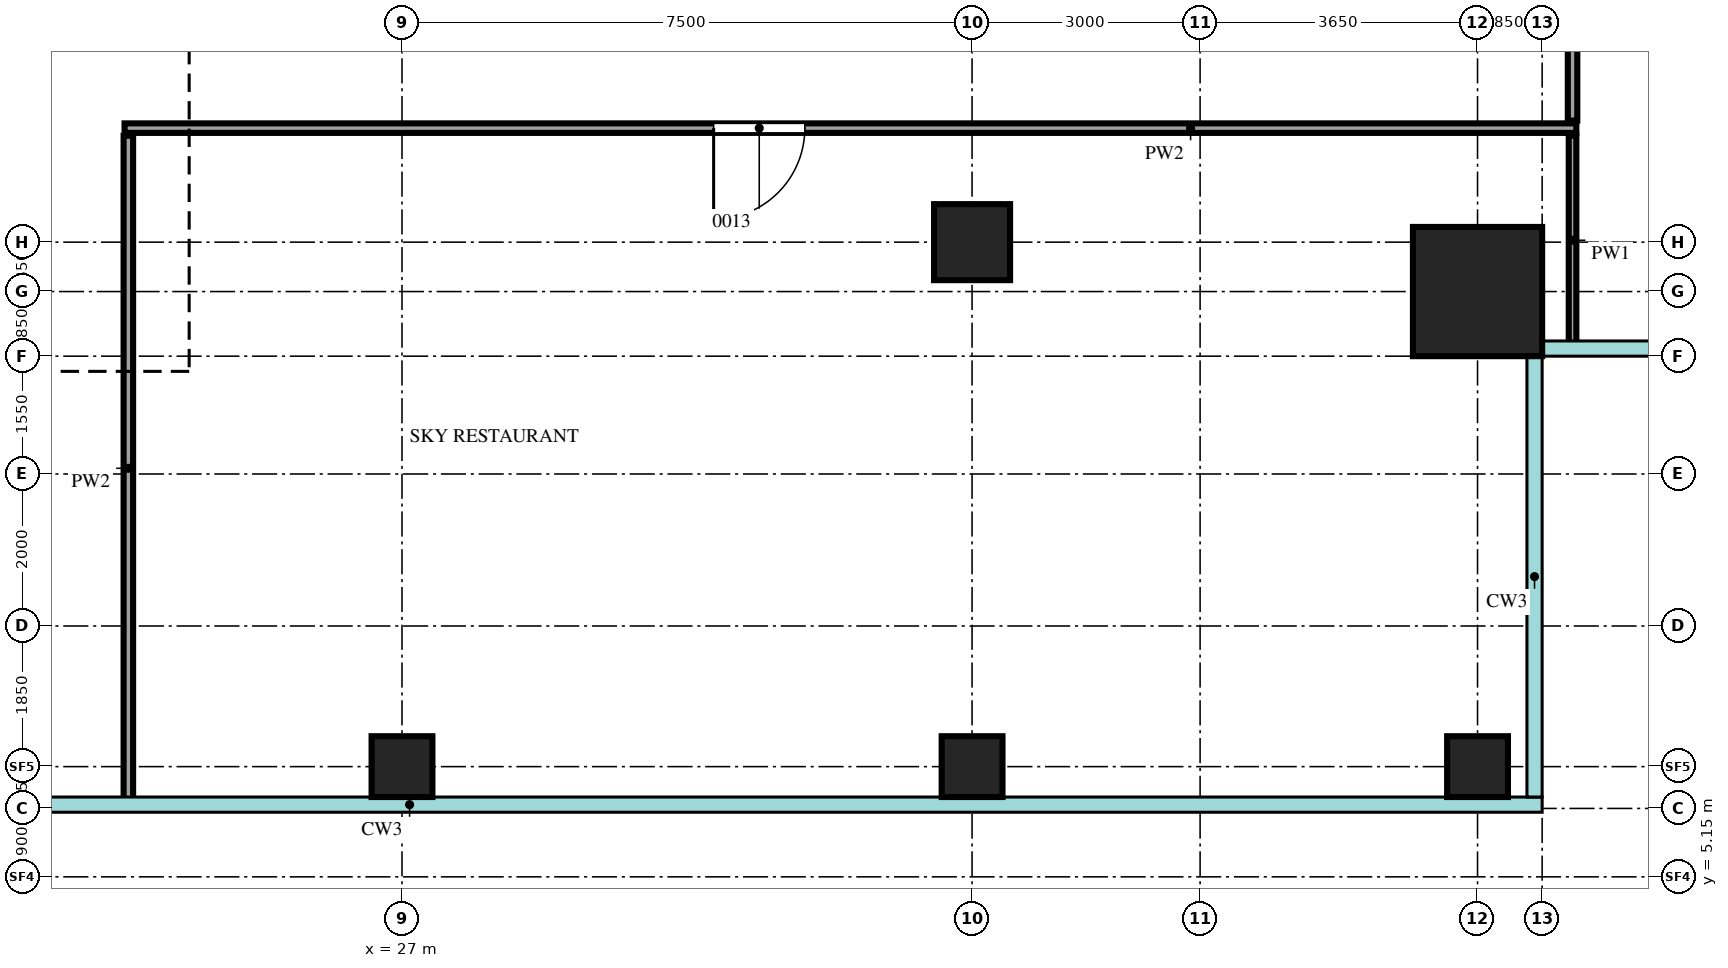
"""IFC4 building model, lengths in metres.
Left out: names, types, materials, properties, quantities, classifications, styles, units other than length and angle.
Written with IfcOpenShell. Run it as: python <this file> out.ifc"""

import sys

from ifc_helpers import new_model, si_unit, direction, frame, frame_2d, origin, origin_2d, place, context, subcontext, project, spatial, rectangle, extrude, source, transform, mapped, element, fill, save


model = new_model("IFC4")
c1 = context("Model", 3, precision=1e-05, world=origin(), true_north=direction((0.0, 1.0)))
c2 = subcontext(c1, "Body", "Model", "MODEL_VIEW")
j1 = project(units=[si_unit("LENGTHUNIT", "METRE"), si_unit("PLANEANGLEUNIT", "RADIAN")], contexts=[c1])
p1 = place(None, origin())
s1 = spatial("IfcSite", under=j1, at=p1, CompositionType="ELEMENT")
p2 = place(p1, origin())
s2 = spatial("IfcBuilding", under=s1, at=p2, CompositionType="ELEMENT")
p3 = place(p2, frame((0.0, 0.0, 310.2)))
s3 = spatial("IfcBuildingStorey", under=s2, at=p3, CompositionType="ELEMENT", Elevation=310.2)
m1 = source(origin(), c2, "Body", "SweptSolid", [
    extrude(rectangle(XDim=1.7, YDim=1.7, at=origin_2d()), origin(), (0.0, 0.0, 1.0), 3.75),
])
p4 = place(p3, frame((41.15, 12.85, 0.0), z_axis=(0.0, 0.0, 1.0), x_axis=(1.0, 0.0, 0.0)))
e1 = element("IfcColumn", 1, at=p4, inside=s3, PredefinedType="COLUMN", context=c2, shape_type="MappedRepresentation", body=[
    mapped(m1, transform((0.0, 0.0, 0.0))),
])
m2 = source(origin(), c2, "Body", "SweptSolid", [
    extrude(rectangle(XDim=0.8, YDim=0.8, at=origin_2d()), origin(), (0.0, 0.0, 1.0), 3.75),
])
for number, where, z_axis, x_axis in (
    (2, (27.0, 6.6, 0.0), (0.0, 0.0, 1.0), (1.0, 0.0, 0.0)),
    (3, (34.5, 6.6, 0.0), (0.0, 0.0, 1.0), (1.0, 0.0, 0.0)),
    (4, (41.15, 6.6, 0.0), (0.0, 0.0, 1.0), (1.0, 0.0, 0.0)),
):
    element("IfcColumn", number, at=place(p3, frame(where, z_axis=z_axis, x_axis=x_axis)), inside=s3, PredefinedType="COLUMN", context=c2, shape_type="MappedRepresentation", body=[
        mapped(m2, transform((0.0, 0.0, 0.0))),
    ])
m3 = source(origin(), c2, "Body", "SweptSolid", [
    extrude(rectangle(XDim=1.0, YDim=1.0, at=origin_2d()), origin(), (0.0, 0.0, 1.0), 3.75),
])
p5 = place(p3, frame((34.5, 13.5, 0.0), z_axis=(0.0, 0.0, 1.0), x_axis=(1.0, 0.0, 0.0)))
e5 = element("IfcColumn", 5, at=p5, inside=s3, PredefinedType="COLUMN", context=c2, shape_type="MappedRepresentation", body=[
    mapped(m3, transform((0.0, 0.0, 0.0))),
])
m4 = source(origin(), c2, "Body", "SweptSolid", [
    extrude(rectangle(XDim=8.75, YDim=0.125, at=frame_2d((4.375, 0.0))), origin(), (0.0, 0.0, 1.0), 3.8),
])
p6 = place(p3, frame((23.4, 6.15, 0.0), z_axis=(0.0, 0.0, 1.0), x_axis=(0.0, 1.0, 0.0)))
e6 = element("IfcWall", 6, at=p6, inside=s3, PredefinedType="PARTITIONING", context=c2, shape_type="MappedRepresentation", body=[
    mapped(m4, transform((0.0, 0.0, 0.0))),
])
m5 = source(origin(), c2, "Body", "SweptSolid", [
    extrude(rectangle(XDim=2.75, YDim=0.1, at=frame_2d((1.375, 0.0))), origin(), (0.0, 0.0, 1.0), 3.8),
])
p7 = place(p3, frame((42.4, 12.15, 0.0), z_axis=(0.0, 0.0, 1.0), x_axis=(0.0, 1.0, 0.0)))
e7 = element("IfcWall", 7, at=p7, inside=s3, PredefinedType="PARTITIONING", context=c2, shape_type="MappedRepresentation", body=[
    mapped(m5, transform((0.0, 0.0, 0.0))),
])
m6 = source(origin(), c2, "Body", "SweptSolid", [
    extrude(rectangle(XDim=19.1, YDim=0.125, at=frame_2d((9.55, 0.0))), origin(), (0.0, 0.0, 1.0), 3.8),
])
p8 = place(p3, frame((23.35, 15.0, 0.0), z_axis=(0.0, 0.0, 1.0), x_axis=(1.0, 0.0, 0.0)))
e8 = element("IfcWall", 8, at=p8, inside=s3, PredefinedType="PARTITIONING", context=c2, shape_type="MappedRepresentation", body=[
    mapped(m6, transform((0.0, 0.0, 0.0))),
])
m7 = source(origin(), c2, "Body", "SweptSolid", [
    extrude(rectangle(XDim=1.2, YDim=2.1, at=frame_2d((0.6, 1.05))), frame((0.0, 0.073, 0.0), z_axis=(0.0, -1.0, 0.0), x_axis=(1.0, 0.0, 0.0)), (0.0, 0.0, 1.0), 0.145),
])
p9 = place(p8, frame((7.75, 0.0, 0.0)))
e9 = element("IfcOpeningElement", 9, at=p9, cuts=e8, PredefinedType="OPENING", context=c2, shape_type="MappedRepresentation", body=[
    mapped(m7, transform((0.0, 0.0, 0.0))),
])
m8 = source(origin(), c2, "Body", "SweptSolid", [
    extrude(rectangle(XDim=23.8, YDim=0.125, at=frame_2d((11.9, 0.0))), origin(), (0.0, 0.0, 1.0), 3.8),
])
p10 = place(p3, frame((42.4, 15.1, 0.0), z_axis=(0.0, 0.0, 1.0), x_axis=(0.0, 1.0, 0.0)))
e10 = element("IfcWall", 10, at=p10, inside=s3, PredefinedType="PARTITIONING", context=c2, shape_type="MappedRepresentation", body=[
    mapped(m8, transform((0.0, 0.0, 0.0))),
])
p11 = place(p10, frame((1.55, 0.0, 0.0)))
e11 = element("IfcOpeningElement", 11, at=p11, cuts=e10, PredefinedType="OPENING", context=c2, shape_type="MappedRepresentation", body=[
    mapped(m7, transform((0.0, 0.0, 0.0))),
])
p12 = place(p10, frame((7.55, 0.0, 0.0)))
e12 = element("IfcOpeningElement", 12, at=p12, cuts=e10, PredefinedType="OPENING", context=c2, shape_type="MappedRepresentation", body=[
    mapped(m7, transform((0.0, 0.0, 0.0))),
])
m9 = source(origin(), c2, "Body", "SweptSolid", [
    extrude(rectangle(XDim=0.9, YDim=2.1, at=frame_2d((0.45, 1.05))), frame((0.0, 0.073, 0.0), z_axis=(0.0, -1.0, 0.0), x_axis=(1.0, 0.0, 0.0)), (0.0, 0.0, 1.0), 0.145),
])
p13 = place(p10, frame((13.3, 0.0, 0.0)))
e13 = element("IfcOpeningElement", 13, at=p13, cuts=e10, PredefinedType="OPENING", context=c2, shape_type="MappedRepresentation", body=[
    mapped(m9, transform((0.0, 0.0, 0.0))),
])
p14 = place(p10, frame((17.35, 0.0, 0.0)))
e14 = element("IfcOpeningElement", 14, at=p14, cuts=e10, PredefinedType="OPENING", context=c2, shape_type="MappedRepresentation", body=[
    mapped(m9, transform((0.0, 0.0, 0.0))),
])
m10 = source(origin(), c2, "Body", "SweptSolid", [
    extrude(rectangle(XDim=1.0, YDim=2.1, at=frame_2d((0.5, 1.05))), frame((0.0, 0.073, 0.0), z_axis=(0.0, -1.0, 0.0), x_axis=(1.0, 0.0, 0.0)), (0.0, 0.0, 1.0), 0.145),
])
p15 = place(p10, frame((21.15, 0.0, 0.0)))
e15 = element("IfcOpeningElement", 15, at=p15, cuts=e10, PredefinedType="OPENING", context=c2, shape_type="MappedRepresentation", body=[
    mapped(m10, transform((0.0, 0.0, 0.0))),
])
m11 = source(origin(), c2, "Body", "SweptSolid", [
    extrude(rectangle(XDim=1.2, YDim=2.1, at=frame_2d((0.6, 1.05))), frame((0.0, 0.025, 0.0), z_axis=(0.0, -1.0, 0.0), x_axis=(1.0, 0.0, 0.0)), (0.0, 0.0, 1.0), 0.05),
])
p16 = place(p9, origin())
e16 = element("IfcDoor", 16, at=p16, inside=s3, OperationType="SINGLE_SWING_LEFT", PredefinedType="DOOR", context=c2, shape_type="MappedRepresentation", body=[
    mapped(m11, transform((0.0, 0.0, 0.0))),
])
fill(e9, e16)
save(model, sys.argv[1])
